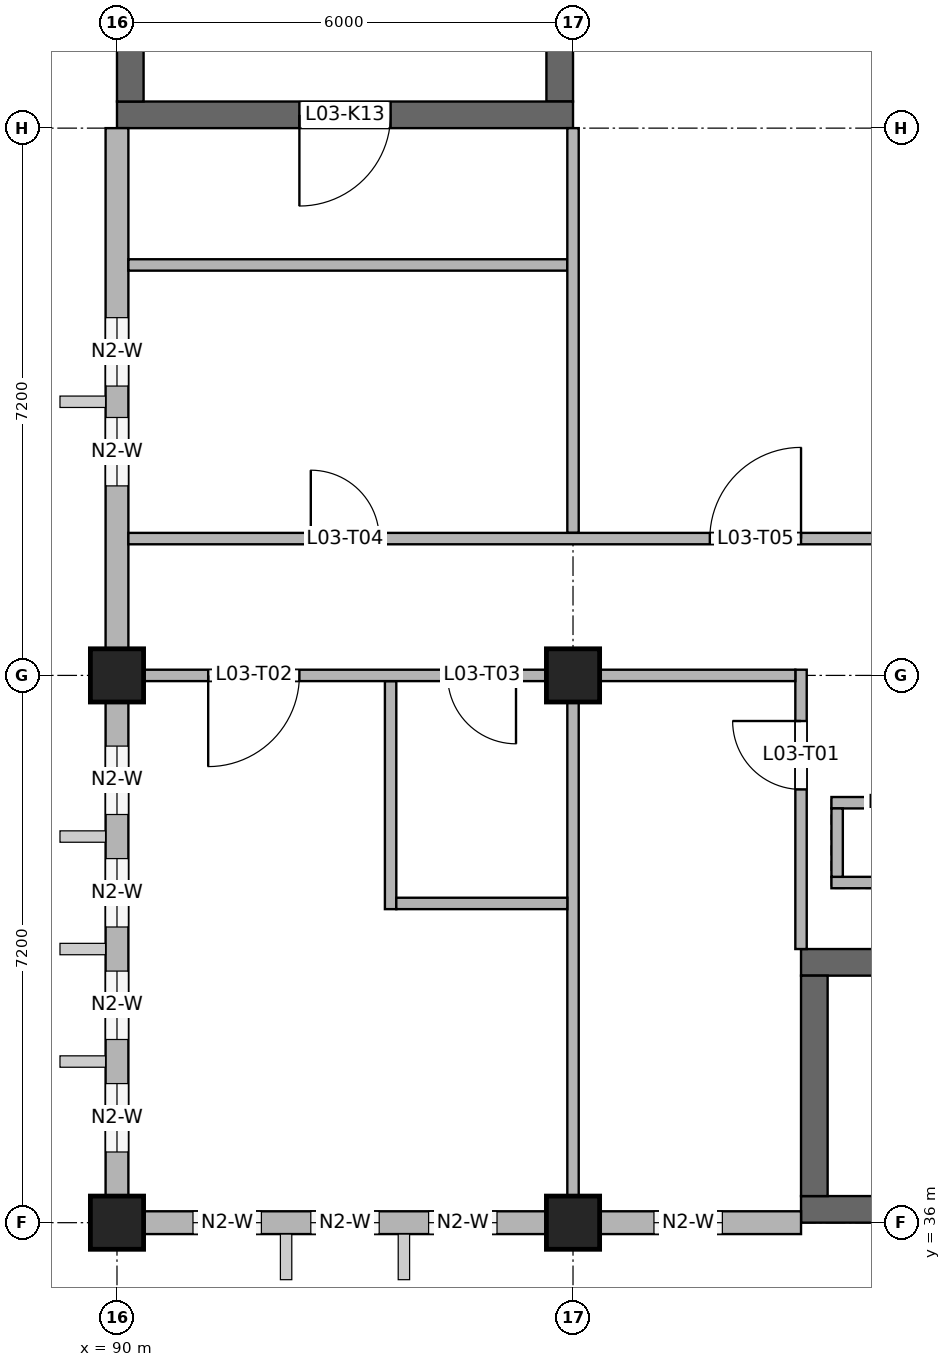
"""IFC4 building model, lengths in metres.
Left out: names, types, materials, properties, quantities, classifications, styles, units other than length and angle.
Written with IfcOpenShell. Run it as: python <this file> out.ifc"""

import sys

from ifc_helpers import new_model, si_unit, direction, frame, frame_2d, origin, origin_2d, place, context, subcontext, project, spatial, rectangle, extrude, element, fill, save


model = new_model("IFC4")
c1 = context("Model", 3, precision=1e-05, world=origin(), true_north=direction((0.0, 1.0)))
c2 = subcontext(c1, "Body", "Model", "MODEL_VIEW")
j1 = project(units=[si_unit("LENGTHUNIT", "METRE"), si_unit("PLANEANGLEUNIT", "RADIAN")], contexts=[c1])
p1 = place(None, origin())
s1 = spatial("IfcSite", under=j1, at=p1, CompositionType="ELEMENT")
p2 = place(p1, origin())
s2 = spatial("IfcBuilding", under=s1, at=p2, CompositionType="ELEMENT")
p3 = place(p2, frame((0.0, 0.0, 12.6)))
s3 = spatial("IfcBuildingStorey", under=s2, at=p3, CompositionType="ELEMENT", Elevation=12.6)
p4 = place(p3, frame((99.0, 36.175, 0.0), z_axis=(0.0, 0.0, 1.0), x_axis=(1.0, 0.0, 0.0)))
e1 = element("IfcWall", 1, at=p4, inside=s3, PredefinedType="SHEAR", context=c2, shape_type="SweptSolid", body=[
    extrude(rectangle(XDim=3.0, YDim=0.35, at=frame_2d((1.5, 0.0))), origin(), (0.0, 0.0, 1.0), 4.2),
])
p5 = place(p3, frame((99.0, 39.425, 0.0), z_axis=(0.0, 0.0, 1.0), x_axis=(1.0, 0.0, 0.0)))
e2 = element("IfcWall", 2, at=p5, inside=s3, PredefinedType="SHEAR", context=c2, shape_type="SweptSolid", body=[
    extrude(rectangle(XDim=3.0, YDim=0.35, at=frame_2d((1.5, 0.0))), origin(), (0.0, 0.0, 1.0), 4.2),
])
p6 = place(p5, frame((0.95, 0.0, 0.0)))
e3 = element("IfcOpeningElement", 3, at=p6, cuts=e2, PredefinedType="OPENING", context=c2, shape_type="SweptSolid", body=[
    extrude(rectangle(XDim=1.1, YDim=2.1, at=frame_2d((0.55, 1.05))), frame((0.0, 0.185, 0.0), z_axis=(0.0, -1.0, 0.0), x_axis=(1.0, 0.0, 0.0)), (0.0, 0.0, 1.0), 0.37),
])
p7 = place(p3, frame((99.175, 36.35, 0.0), z_axis=(0.0, 0.0, 1.0), x_axis=(0.0, 1.0, 0.0)))
e4 = element("IfcWall", 4, at=p7, inside=s3, PredefinedType="SHEAR", context=c2, shape_type="SweptSolid", body=[
    extrude(rectangle(XDim=2.9, YDim=0.35, at=frame_2d((1.45, 0.0))), origin(), (0.0, 0.0, 1.0), 4.2),
])
p8 = place(p3, frame((90.0, 50.575, 0.0), z_axis=(0.0, 0.0, 1.0), x_axis=(1.0, 0.0, 0.0)))
e5 = element("IfcWall", 5, at=p8, inside=s3, PredefinedType="SHEAR", context=c2, shape_type="SweptSolid", body=[
    extrude(rectangle(XDim=6.0, YDim=0.35, at=frame_2d((3.0, 0.0))), origin(), (0.0, 0.0, 1.0), 4.0),
])
p9 = place(p8, frame((2.4, 0.0, 0.0)))
e6 = element("IfcOpeningElement", 6, at=p9, cuts=e5, PredefinedType="OPENING", context=c2, shape_type="SweptSolid", body=[
    extrude(rectangle(XDim=1.2, YDim=2.1, at=frame_2d((0.6, 1.05))), frame((0.0, 0.185, 0.0), z_axis=(0.0, -1.0, 0.0), x_axis=(1.0, 0.0, 0.0)), (0.0, 0.0, 1.0), 0.37),
])
for number, where, z_axis, x_axis in (
    (7, (90.175, 50.75, 0.0), (0.0, 0.0, 1.0), (0.0, 1.0, 0.0)),
    (8, (95.825, 50.75, 0.0), (0.0, 0.0, 1.0), (0.0, 1.0, 0.0)),
):
    element("IfcWall", number, at=place(p3, frame(where, z_axis=z_axis, x_axis=x_axis)), inside=s3, PredefinedType="SHEAR", context=c2, shape_type="SweptSolid", body=[
        extrude(rectangle(XDim=6.5, YDim=0.35, at=frame_2d((3.25, 0.0))), origin(), (0.0, 0.0, 1.0), 4.0),
    ])
p10 = place(p3, frame((99.4, 40.475, 0.0), z_axis=(0.0, 0.0, 1.0), x_axis=(1.0, 0.0, 0.0)))
e9 = element("IfcWall", 9, at=p10, inside=s3, PredefinedType="SOLIDWALL", context=c2, shape_type="SweptSolid", body=[
    extrude(rectangle(XDim=2.0, YDim=0.15, at=frame_2d((1.0, 0.0))), origin(), (0.0, 0.0, 1.0), 4.2),
])
p11 = place(p3, frame((99.4, 41.525, 0.0), z_axis=(0.0, 0.0, 1.0), x_axis=(1.0, 0.0, 0.0)))
e10 = element("IfcWall", 10, at=p11, inside=s3, PredefinedType="SOLIDWALL", context=c2, shape_type="SweptSolid", body=[
    extrude(rectangle(XDim=2.0, YDim=0.15, at=frame_2d((1.0, 0.0))), origin(), (0.0, 0.0, 1.0), 4.2),
])
p12 = place(p11, frame((0.6, 0.0, 0.0)))
e11 = element("IfcOpeningElement", 11, at=p12, cuts=e10, PredefinedType="OPENING", context=c2, shape_type="SweptSolid", body=[
    extrude(rectangle(XDim=0.8, YDim=2.1, at=frame_2d((0.4, 1.05))), frame((0.0, 0.085, 0.0), z_axis=(0.0, -1.0, 0.0), x_axis=(1.0, 0.0, 0.0)), (0.0, 0.0, 1.0), 0.17),
])
p13 = place(p3, frame((99.475, 40.55, 0.0), z_axis=(0.0, 0.0, 1.0), x_axis=(0.0, 1.0, 0.0)))
e12 = element("IfcWall", 12, at=p13, inside=s3, PredefinedType="SOLIDWALL", context=c2, shape_type="SweptSolid", body=[
    extrude(rectangle(XDim=0.9, YDim=0.15, at=frame_2d((0.45, 0.0))), origin(), (0.0, 0.0, 1.0), 4.2),
])
for number, where, z_axis, x_axis in (
    (13, (90.0, 36.0, 0.0), (0.0, 0.0, 1.0), (1.0, 0.0, 0.0)),
    (14, (96.0, 36.0, 0.0), (0.0, 0.0, 1.0), (1.0, 0.0, 0.0)),
    (15, (90.0, 43.2, 0.0), (0.0, 0.0, 1.0), (1.0, 0.0, 0.0)),
    (16, (96.0, 43.2, 0.0), (0.0, 0.0, 1.0), (1.0, 0.0, 0.0)),
):
    element("IfcColumn", number, at=place(p3, frame(where, z_axis=z_axis, x_axis=x_axis)), inside=s3, PredefinedType="COLUMN", context=c2, shape_type="SweptSolid", body=[
        extrude(rectangle(XDim=0.7, YDim=0.7, at=origin_2d()), origin(), (0.0, 0.0, 1.0), 4.0),
    ])
p14 = place(p3, frame((90.0, 36.35, 0.0), z_axis=(0.0, 0.0, 1.0), x_axis=(0.0, 1.0, 0.0)))
e17 = element("IfcWall", 17, at=p14, inside=s3, PredefinedType="SOLIDWALL", context=c2, shape_type="SweptSolid", body=[
    extrude(rectangle(XDim=6.5, YDim=0.3, at=frame_2d((3.25, 0.0))), origin(), (0.0, 0.0, 1.0), 3.2),
])
p15 = place(p14, frame((0.58, 0.0, 0.9)))
e18 = element("IfcOpeningElement", 18, at=p15, cuts=e17, PredefinedType="OPENING", context=c2, shape_type="SweptSolid", body=[
    extrude(rectangle(XDim=0.9, YDim=1.2, at=frame_2d((0.45, 0.6))), frame((0.0, 0.16, 0.0), z_axis=(0.0, -1.0, 0.0), x_axis=(1.0, 0.0, 0.0)), (0.0, 0.0, 1.0), 0.32),
])
p16 = place(p14, frame((2.06, 0.0, 0.9)))
e19 = element("IfcOpeningElement", 19, at=p16, cuts=e17, PredefinedType="OPENING", context=c2, shape_type="SweptSolid", body=[
    extrude(rectangle(XDim=0.9, YDim=1.2, at=frame_2d((0.45, 0.6))), frame((0.0, 0.16, 0.0), z_axis=(0.0, -1.0, 0.0), x_axis=(1.0, 0.0, 0.0)), (0.0, 0.0, 1.0), 0.32),
])
p17 = place(p14, frame((3.54, 0.0, 0.9)))
e20 = element("IfcOpeningElement", 20, at=p17, cuts=e17, PredefinedType="OPENING", context=c2, shape_type="SweptSolid", body=[
    extrude(rectangle(XDim=0.9, YDim=1.2, at=frame_2d((0.45, 0.6))), frame((0.0, 0.16, 0.0), z_axis=(0.0, -1.0, 0.0), x_axis=(1.0, 0.0, 0.0)), (0.0, 0.0, 1.0), 0.32),
])
p18 = place(p14, frame((5.02, 0.0, 0.9)))
e21 = element("IfcOpeningElement", 21, at=p18, cuts=e17, PredefinedType="OPENING", context=c2, shape_type="SweptSolid", body=[
    extrude(rectangle(XDim=0.9, YDim=1.2, at=frame_2d((0.45, 0.6))), frame((0.0, 0.16, 0.0), z_axis=(0.0, -1.0, 0.0), x_axis=(1.0, 0.0, 0.0)), (0.0, 0.0, 1.0), 0.32),
])
p19 = place(p3, frame((90.0, 43.55, 0.0), z_axis=(0.0, 0.0, 1.0), x_axis=(0.0, 1.0, 0.0)))
e22 = element("IfcWall", 22, at=p19, inside=s3, PredefinedType="SOLIDWALL", context=c2, shape_type="SweptSolid", body=[
    extrude(rectangle(XDim=6.85, YDim=0.3, at=frame_2d((3.425, 0.0))), origin(), (0.0, 0.0, 1.0), 3.1),
])
p20 = place(p19, frame((2.143, 0.0, 0.9)))
e23 = element("IfcOpeningElement", 23, at=p20, cuts=e22, PredefinedType="OPENING", context=c2, shape_type="SweptSolid", body=[
    extrude(rectangle(XDim=0.9, YDim=1.2, at=frame_2d((0.45, 0.6))), frame((0.0, 0.16, 0.0), z_axis=(0.0, -1.0, 0.0), x_axis=(1.0, 0.0, 0.0)), (0.0, 0.0, 1.0), 0.32),
])
p21 = place(p19, frame((3.457, 0.0, 0.9)))
e24 = element("IfcOpeningElement", 24, at=p21, cuts=e22, PredefinedType="OPENING", context=c2, shape_type="SweptSolid", body=[
    extrude(rectangle(XDim=0.9, YDim=1.2, at=frame_2d((0.45, 0.6))), frame((0.0, 0.16, 0.0), z_axis=(0.0, -1.0, 0.0), x_axis=(1.0, 0.0, 0.0)), (0.0, 0.0, 1.0), 0.32),
])
p22 = place(p3, frame((90.35, 36.0, 0.0), z_axis=(0.0, 0.0, 1.0), x_axis=(1.0, 0.0, 0.0)))
e25 = element("IfcWall", 25, at=p22, inside=s3, PredefinedType="SOLIDWALL", context=c2, shape_type="SweptSolid", body=[
    extrude(rectangle(XDim=5.3, YDim=0.3, at=frame_2d((2.65, 0.0))), origin(), (0.0, 0.0, 1.0), 3.3),
])
p23 = place(p22, frame((0.65, 0.0, 0.9)))
e26 = element("IfcOpeningElement", 26, at=p23, cuts=e25, PredefinedType="OPENING", context=c2, shape_type="SweptSolid", body=[
    extrude(rectangle(XDim=0.9, YDim=1.2, at=frame_2d((0.45, 0.6))), frame((0.0, 0.16, 0.0), z_axis=(0.0, -1.0, 0.0), x_axis=(1.0, 0.0, 0.0)), (0.0, 0.0, 1.0), 0.32),
])
p24 = place(p22, frame((2.2, 0.0, 0.9)))
e27 = element("IfcOpeningElement", 27, at=p24, cuts=e25, PredefinedType="OPENING", context=c2, shape_type="SweptSolid", body=[
    extrude(rectangle(XDim=0.9, YDim=1.2, at=frame_2d((0.45, 0.6))), frame((0.0, 0.16, 0.0), z_axis=(0.0, -1.0, 0.0), x_axis=(1.0, 0.0, 0.0)), (0.0, 0.0, 1.0), 0.32),
])
p25 = place(p22, frame((3.75, 0.0, 0.9)))
e28 = element("IfcOpeningElement", 28, at=p25, cuts=e25, PredefinedType="OPENING", context=c2, shape_type="SweptSolid", body=[
    extrude(rectangle(XDim=0.9, YDim=1.2, at=frame_2d((0.45, 0.6))), frame((0.0, 0.16, 0.0), z_axis=(0.0, -1.0, 0.0), x_axis=(1.0, 0.0, 0.0)), (0.0, 0.0, 1.0), 0.32),
])
p26 = place(p3, frame((96.35, 36.0, 0.0), z_axis=(0.0, 0.0, 1.0), x_axis=(1.0, 0.0, 0.0)))
e29 = element("IfcWall", 29, at=p26, inside=s3, PredefinedType="SOLIDWALL", context=c2, shape_type="SweptSolid", body=[
    extrude(rectangle(XDim=2.65, YDim=0.3, at=frame_2d((1.325, 0.0))), origin(), (0.0, 0.0, 1.0), 3.3),
])
p27 = place(p26, frame((0.715, 0.0, 0.9)))
e30 = element("IfcOpeningElement", 30, at=p27, cuts=e29, PredefinedType="OPENING", context=c2, shape_type="SweptSolid", body=[
    extrude(rectangle(XDim=0.9, YDim=1.2, at=frame_2d((0.45, 0.6))), frame((0.0, 0.16, 0.0), z_axis=(0.0, -1.0, 0.0), x_axis=(1.0, 0.0, 0.0)), (0.0, 0.0, 1.0), 0.32),
])
p28 = place(p3, frame((93.6, 40.125, 0.0), z_axis=(0.0, 0.0, 1.0), x_axis=(0.0, 1.0, 0.0)))
e31 = element("IfcWall", 31, at=p28, inside=s3, PredefinedType="PARTITIONING", context=c2, shape_type="SweptSolid", body=[
    extrude(rectangle(XDim=3.0, YDim=0.15, at=frame_2d((1.5, 0.0))), origin(), (0.0, 0.0, 1.0), 3.3),
])
p29 = place(p3, frame((96.0, 36.15, 0.0), z_axis=(0.0, 0.0, 1.0), x_axis=(0.0, 1.0, 0.0)))
e32 = element("IfcWall", 32, at=p29, inside=s3, PredefinedType="PARTITIONING", context=c2, shape_type="SweptSolid", body=[
    extrude(rectangle(XDim=6.975, YDim=0.15, at=frame_2d((3.488, 0.0))), origin(), (0.0, 0.0, 1.0), 3.2),
])
p30 = place(p3, frame((96.0, 45.075, 0.0), z_axis=(0.0, 0.0, 1.0), x_axis=(0.0, 1.0, 0.0)))
e33 = element("IfcWall", 33, at=p30, inside=s3, PredefinedType="PARTITIONING", context=c2, shape_type="SweptSolid", body=[
    extrude(rectangle(XDim=5.325, YDim=0.15, at=frame_2d((2.663, 0.0))), origin(), (0.0, 0.0, 1.0), 4.0),
])
p31 = place(p3, frame((99.0, 39.6, 0.0), z_axis=(0.0, 0.0, 1.0), x_axis=(0.0, 1.0, 0.0)))
e34 = element("IfcWall", 34, at=p31, inside=s3, PredefinedType="PARTITIONING", context=c2, shape_type="SweptSolid", body=[
    extrude(rectangle(XDim=3.675, YDim=0.15, at=frame_2d((1.837, 0.0))), origin(), (0.0, 0.0, 1.0), 4.0),
])
p32 = place(p31, frame((2.1, 0.0, 0.0)))
e35 = element("IfcOpeningElement", 35, at=p32, cuts=e34, PredefinedType="OPENING", context=c2, shape_type="SweptSolid", body=[
    extrude(rectangle(XDim=0.9, YDim=2.1, at=frame_2d((0.45, 1.05))), frame((0.0, 0.085, 0.0), z_axis=(0.0, -1.0, 0.0), x_axis=(1.0, 0.0, 0.0)), (0.0, 0.0, 1.0), 0.17),
])
p33 = place(p3, frame((93.675, 40.2, 0.0), z_axis=(0.0, 0.0, 1.0), x_axis=(1.0, 0.0, 0.0)))
e36 = element("IfcWall", 36, at=p33, inside=s3, PredefinedType="PARTITIONING", context=c2, shape_type="SweptSolid", body=[
    extrude(rectangle(XDim=2.25, YDim=0.15, at=frame_2d((1.125, 0.0))), origin(), (0.0, 0.0, 1.0), 3.2),
])
p34 = place(p3, frame((90.15, 43.2, 0.0), z_axis=(0.0, 0.0, 1.0), x_axis=(1.0, 0.0, 0.0)))
e37 = element("IfcWall", 37, at=p34, inside=s3, PredefinedType="PARTITIONING", context=c2, shape_type="SweptSolid", body=[
    extrude(rectangle(XDim=8.775, YDim=0.15, at=frame_2d((4.388, 0.0))), origin(), (0.0, 0.0, 1.0), 3.3),
])
p35 = place(p34, frame((1.05, 0.0, 0.0)))
e38 = element("IfcOpeningElement", 38, at=p35, cuts=e37, PredefinedType="OPENING", context=c2, shape_type="SweptSolid", body=[
    extrude(rectangle(XDim=1.2, YDim=2.1, at=frame_2d((0.6, 1.05))), frame((0.0, 0.085, 0.0), z_axis=(0.0, -1.0, 0.0), x_axis=(1.0, 0.0, 0.0)), (0.0, 0.0, 1.0), 0.17),
])
p36 = place(p34, frame((4.2, 0.0, 0.0)))
e39 = element("IfcOpeningElement", 39, at=p36, cuts=e37, PredefinedType="OPENING", context=c2, shape_type="SweptSolid", body=[
    extrude(rectangle(XDim=0.9, YDim=2.1, at=frame_2d((0.45, 1.05))), frame((0.0, 0.085, 0.0), z_axis=(0.0, -1.0, 0.0), x_axis=(1.0, 0.0, 0.0)), (0.0, 0.0, 1.0), 0.17),
])
p37 = place(p3, frame((90.15, 45.0, 0.0), z_axis=(0.0, 0.0, 1.0), x_axis=(1.0, 0.0, 0.0)))
e40 = element("IfcWall", 40, at=p37, inside=s3, PredefinedType="PARTITIONING", context=c2, shape_type="SweptSolid", body=[
    extrude(rectangle(XDim=17.7, YDim=0.15, at=frame_2d((8.85, 0.0))), origin(), (0.0, 0.0, 1.0), 4.0),
])
p38 = place(p37, frame((2.4, 0.0, 0.0)))
e41 = element("IfcOpeningElement", 41, at=p38, cuts=e40, PredefinedType="OPENING", context=c2, shape_type="SweptSolid", body=[
    extrude(rectangle(XDim=0.9, YDim=2.1, at=frame_2d((0.45, 1.05))), frame((0.0, 0.085, 0.0), z_axis=(0.0, -1.0, 0.0), x_axis=(1.0, 0.0, 0.0)), (0.0, 0.0, 1.0), 0.17),
])
p39 = place(p37, frame((7.65, 0.0, 0.0)))
e42 = element("IfcOpeningElement", 42, at=p39, cuts=e40, PredefinedType="OPENING", context=c2, shape_type="SweptSolid", body=[
    extrude(rectangle(XDim=1.2, YDim=2.1, at=frame_2d((0.6, 1.05))), frame((0.0, 0.085, 0.0), z_axis=(0.0, -1.0, 0.0), x_axis=(1.0, 0.0, 0.0)), (0.0, 0.0, 1.0), 0.17),
])
p40 = place(p37, frame((12.3, 0.0, 0.0)))
e43 = element("IfcOpeningElement", 43, at=p40, cuts=e40, PredefinedType="OPENING", context=c2, shape_type="SweptSolid", body=[
    extrude(rectangle(XDim=0.9, YDim=2.1, at=frame_2d((0.45, 1.05))), frame((0.0, 0.085, 0.0), z_axis=(0.0, -1.0, 0.0), x_axis=(1.0, 0.0, 0.0)), (0.0, 0.0, 1.0), 0.17),
])
p41 = place(p37, frame((15.9, 0.0, 0.0)))
e44 = element("IfcOpeningElement", 44, at=p41, cuts=e40, PredefinedType="OPENING", context=c2, shape_type="SweptSolid", body=[
    extrude(rectangle(XDim=0.9, YDim=2.1, at=frame_2d((0.45, 1.05))), frame((0.0, 0.085, 0.0), z_axis=(0.0, -1.0, 0.0), x_axis=(1.0, 0.0, 0.0)), (0.0, 0.0, 1.0), 0.17),
])
p42 = place(p3, frame((90.15, 48.6, 0.0), z_axis=(0.0, 0.0, 1.0), x_axis=(1.0, 0.0, 0.0)))
e45 = element("IfcWall", 45, at=p42, inside=s3, PredefinedType="PARTITIONING", context=c2, shape_type="SweptSolid", body=[
    extrude(rectangle(XDim=5.775, YDim=0.15, at=frame_2d((2.888, 0.0))), origin(), (0.0, 0.0, 1.0), 4.0),
])
p43 = place(p15, origin())
e46 = element("IfcWindow", 46, at=p43, inside=s3, PartitioningType="SINGLE_PANEL", PredefinedType="WINDOW", context=c2, shape_type="SweptSolid", body=[
    extrude(rectangle(XDim=0.9, YDim=1.2, at=frame_2d((0.45, 0.6))), frame((0.0, 0.03, 0.0), z_axis=(0.0, -1.0, 0.0), x_axis=(1.0, 0.0, 0.0)), (0.0, 0.0, 1.0), 0.06),
])
fill(e18, e46)
p44 = place(p16, origin())
e47 = element("IfcWindow", 47, at=p44, inside=s3, PartitioningType="SINGLE_PANEL", PredefinedType="WINDOW", context=c2, shape_type="SweptSolid", body=[
    extrude(rectangle(XDim=0.9, YDim=1.2, at=frame_2d((0.45, 0.6))), frame((0.0, 0.03, 0.0), z_axis=(0.0, -1.0, 0.0), x_axis=(1.0, 0.0, 0.0)), (0.0, 0.0, 1.0), 0.06),
])
fill(e19, e47)
p45 = place(p17, origin())
e48 = element("IfcWindow", 48, at=p45, inside=s3, PartitioningType="SINGLE_PANEL", PredefinedType="WINDOW", context=c2, shape_type="SweptSolid", body=[
    extrude(rectangle(XDim=0.9, YDim=1.2, at=frame_2d((0.45, 0.6))), frame((0.0, 0.03, 0.0), z_axis=(0.0, -1.0, 0.0), x_axis=(1.0, 0.0, 0.0)), (0.0, 0.0, 1.0), 0.06),
])
fill(e20, e48)
p46 = place(p18, origin())
e49 = element("IfcWindow", 49, at=p46, inside=s3, PartitioningType="SINGLE_PANEL", PredefinedType="WINDOW", context=c2, shape_type="SweptSolid", body=[
    extrude(rectangle(XDim=0.9, YDim=1.2, at=frame_2d((0.45, 0.6))), frame((0.0, 0.03, 0.0), z_axis=(0.0, -1.0, 0.0), x_axis=(1.0, 0.0, 0.0)), (0.0, 0.0, 1.0), 0.06),
])
fill(e21, e49)
p47 = place(p20, origin())
e50 = element("IfcWindow", 50, at=p47, inside=s3, PartitioningType="SINGLE_PANEL", PredefinedType="WINDOW", context=c2, shape_type="SweptSolid", body=[
    extrude(rectangle(XDim=0.9, YDim=1.2, at=frame_2d((0.45, 0.6))), frame((0.0, 0.03, 0.0), z_axis=(0.0, -1.0, 0.0), x_axis=(1.0, 0.0, 0.0)), (0.0, 0.0, 1.0), 0.06),
])
fill(e23, e50)
p48 = place(p21, origin())
e51 = element("IfcWindow", 51, at=p48, inside=s3, PartitioningType="SINGLE_PANEL", PredefinedType="WINDOW", context=c2, shape_type="SweptSolid", body=[
    extrude(rectangle(XDim=0.9, YDim=1.2, at=frame_2d((0.45, 0.6))), frame((0.0, 0.03, 0.0), z_axis=(0.0, -1.0, 0.0), x_axis=(1.0, 0.0, 0.0)), (0.0, 0.0, 1.0), 0.06),
])
fill(e24, e51)
p49 = place(p23, origin())
e52 = element("IfcWindow", 52, at=p49, inside=s3, PartitioningType="SINGLE_PANEL", PredefinedType="WINDOW", context=c2, shape_type="SweptSolid", body=[
    extrude(rectangle(XDim=0.9, YDim=1.2, at=frame_2d((0.45, 0.6))), frame((0.0, 0.03, 0.0), z_axis=(0.0, -1.0, 0.0), x_axis=(1.0, 0.0, 0.0)), (0.0, 0.0, 1.0), 0.06),
])
fill(e26, e52)
p50 = place(p24, origin())
e53 = element("IfcWindow", 53, at=p50, inside=s3, PartitioningType="SINGLE_PANEL", PredefinedType="WINDOW", context=c2, shape_type="SweptSolid", body=[
    extrude(rectangle(XDim=0.9, YDim=1.2, at=frame_2d((0.45, 0.6))), frame((0.0, 0.03, 0.0), z_axis=(0.0, -1.0, 0.0), x_axis=(1.0, 0.0, 0.0)), (0.0, 0.0, 1.0), 0.06),
])
fill(e27, e53)
p51 = place(p25, origin())
e54 = element("IfcWindow", 54, at=p51, inside=s3, PartitioningType="SINGLE_PANEL", PredefinedType="WINDOW", context=c2, shape_type="SweptSolid", body=[
    extrude(rectangle(XDim=0.9, YDim=1.2, at=frame_2d((0.45, 0.6))), frame((0.0, 0.03, 0.0), z_axis=(0.0, -1.0, 0.0), x_axis=(1.0, 0.0, 0.0)), (0.0, 0.0, 1.0), 0.06),
])
fill(e28, e54)
p52 = place(p27, origin())
e55 = element("IfcWindow", 55, at=p52, inside=s3, PartitioningType="SINGLE_PANEL", PredefinedType="WINDOW", context=c2, shape_type="SweptSolid", body=[
    extrude(rectangle(XDim=0.9, YDim=1.2, at=frame_2d((0.45, 0.6))), frame((0.0, 0.03, 0.0), z_axis=(0.0, -1.0, 0.0), x_axis=(1.0, 0.0, 0.0)), (0.0, 0.0, 1.0), 0.06),
])
fill(e30, e55)
p53 = place(p9, frame((1.2, 0.0, 0.0), z_axis=(0.0, 0.0, 1.0), x_axis=(-1.0, 0.0, 0.0)))
e56 = element("IfcDoor", 56, at=p53, inside=s3, OperationType="SINGLE_SWING_RIGHT", PredefinedType="DOOR", context=c2, shape_type="SweptSolid", body=[
    extrude(rectangle(XDim=1.2, YDim=2.1, at=frame_2d((0.6, 1.05))), frame((0.0, 0.025, 0.0), z_axis=(0.0, -1.0, 0.0), x_axis=(1.0, 0.0, 0.0)), (0.0, 0.0, 1.0), 0.05),
])
fill(e6, e56)
p54 = place(p32, origin())
e57 = element("IfcDoor", 57, at=p54, inside=s3, OperationType="SINGLE_SWING_RIGHT", PredefinedType="DOOR", context=c2, shape_type="SweptSolid", body=[
    extrude(rectangle(XDim=0.9, YDim=2.1, at=frame_2d((0.45, 1.05))), frame((0.0, 0.025, 0.0), z_axis=(0.0, -1.0, 0.0), x_axis=(1.0, 0.0, 0.0)), (0.0, 0.0, 1.0), 0.05),
])
fill(e35, e57)
p55 = place(p35, frame((1.2, 0.0, 0.0), z_axis=(0.0, 0.0, 1.0), x_axis=(-1.0, 0.0, 0.0)))
e58 = element("IfcDoor", 58, at=p55, inside=s3, OperationType="SINGLE_SWING_RIGHT", PredefinedType="DOOR", context=c2, shape_type="SweptSolid", body=[
    extrude(rectangle(XDim=1.2, YDim=2.1, at=frame_2d((0.6, 1.05))), frame((0.0, 0.025, 0.0), z_axis=(0.0, -1.0, 0.0), x_axis=(1.0, 0.0, 0.0)), (0.0, 0.0, 1.0), 0.05),
])
fill(e38, e58)
p56 = place(p36, frame((0.9, 0.0, 0.0), z_axis=(0.0, 0.0, 1.0), x_axis=(-1.0, 0.0, 0.0)))
e59 = element("IfcDoor", 59, at=p56, inside=s3, OperationType="SINGLE_SWING_LEFT", PredefinedType="DOOR", context=c2, shape_type="SweptSolid", body=[
    extrude(rectangle(XDim=0.9, YDim=2.1, at=frame_2d((0.45, 1.05))), frame((0.0, 0.025, 0.0), z_axis=(0.0, -1.0, 0.0), x_axis=(1.0, 0.0, 0.0)), (0.0, 0.0, 1.0), 0.05),
])
fill(e39, e59)
p57 = place(p38, origin())
e60 = element("IfcDoor", 60, at=p57, inside=s3, OperationType="SINGLE_SWING_LEFT", PredefinedType="DOOR", context=c2, shape_type="SweptSolid", body=[
    extrude(rectangle(XDim=0.9, YDim=2.1, at=frame_2d((0.45, 1.05))), frame((0.0, 0.025, 0.0), z_axis=(0.0, -1.0, 0.0), x_axis=(1.0, 0.0, 0.0)), (0.0, 0.0, 1.0), 0.05),
])
fill(e41, e60)
p58 = place(p39, origin())
e61 = element("IfcDoor", 61, at=p58, inside=s3, OperationType="SINGLE_SWING_RIGHT", PredefinedType="DOOR", context=c2, shape_type="SweptSolid", body=[
    extrude(rectangle(XDim=1.2, YDim=2.1, at=frame_2d((0.6, 1.05))), frame((0.0, 0.025, 0.0), z_axis=(0.0, -1.0, 0.0), x_axis=(1.0, 0.0, 0.0)), (0.0, 0.0, 1.0), 0.05),
])
fill(e42, e61)
save(model, sys.argv[1])
